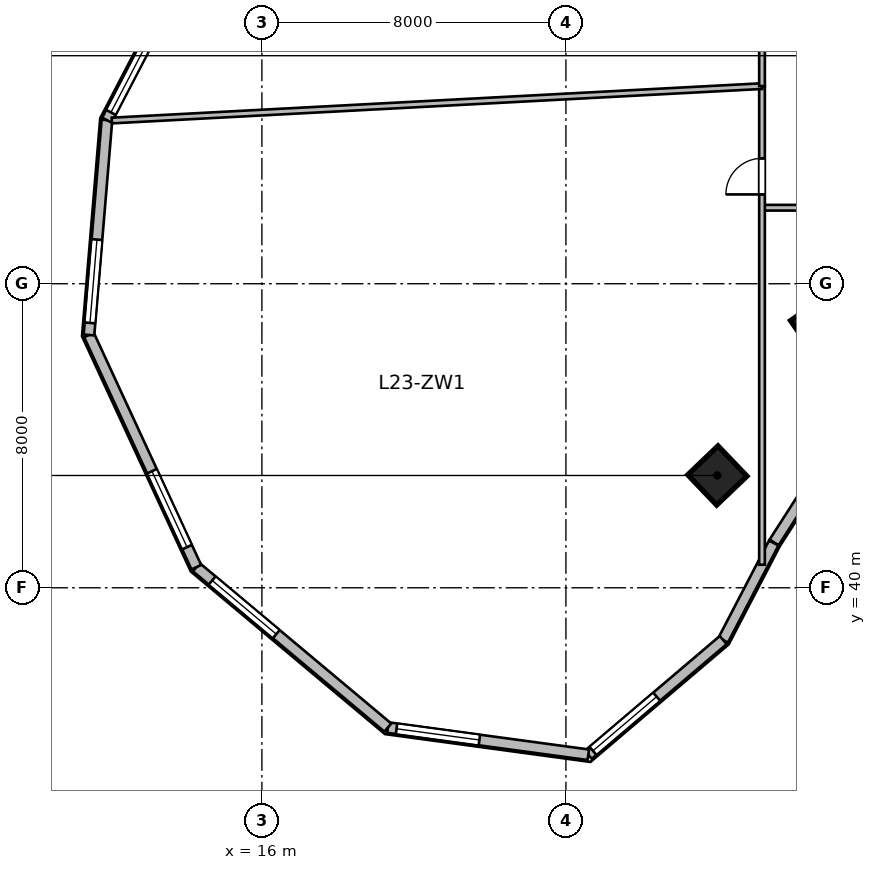
"""IFC4 building model, lengths in metres.
Left out: names, types, materials, properties, quantities, classifications, styles, units other than length and angle.
Written with IfcOpenShell. Run it as: python <this file> out.ifc"""

import sys

from ifc_helpers import new_model, si_unit, direction, frame, frame_2d, origin, origin_2d, place, context, subcontext, project, spatial, rectangle, extrude, source, transform, mapped, element, fill, save


model = new_model("IFC4")
c1 = context("Model", 3, precision=1e-05, world=origin(), true_north=direction((0.0, 1.0)))
c2 = subcontext(c1, "Body", "Model", "MODEL_VIEW")
j1 = project(units=[si_unit("LENGTHUNIT", "METRE"), si_unit("PLANEANGLEUNIT", "RADIAN")], contexts=[c1])
p1 = place(None, origin())
s1 = spatial("IfcSite", under=j1, at=p1, CompositionType="ELEMENT")
p2 = place(p1, origin())
s2 = spatial("IfcBuilding", under=s1, at=p2, CompositionType="ELEMENT")
p3 = place(p2, frame((0.0, 0.0, 99.9)))
s3 = spatial("IfcBuildingStorey", under=s2, at=p3, CompositionType="ELEMENT", Elevation=99.9)
m1 = source(origin(), c2, "Body", "SweptSolid", [
    extrude(rectangle(XDim=1.1, YDim=1.1, at=origin_2d()), origin(), (0.0, 0.0, 1.0), 3.9),
])
for number, where, z_axis, x_axis in (
    (1, (27.985, 42.955, 0.0), (0.0, 0.0, 1.0), (-0.691, 0.723, 0.0)),
    (2, (30.677, 46.892, 0.0), (0.0, 0.0, 1.0), (-0.571, 0.821, 0.0)),
):
    element("IfcColumn", number, at=place(p3, frame(where, z_axis=z_axis, x_axis=x_axis)), inside=s3, PredefinedType="COLUMN", context=c2, shape_type="MappedRepresentation", body=[
        mapped(m1, transform((0.0, 0.0, 0.0), scale=1.0)),
    ])
m2 = source(origin(), c2, "Body", "SweptSolid", [
    extrude(rectangle(XDim=2.84, YDim=0.28, at=frame_2d((1.42, 0.0))), origin(), (0.0, 0.0, 1.0), 3.65),
])
p4 = place(p3, frame((31.011, 43.582, 0.0), z_axis=(0.0, 0.0, 1.0), x_axis=(-0.540214368057, -0.841527442538, 0.0)))
e3 = element("IfcWall", 3, at=p4, inside=s3, PredefinedType="SOLIDWALL", context=c2, shape_type="MappedRepresentation", body=[
    mapped(m2, transform((0.0, 0.0, 0.0), scale=1.0)),
])
m3 = source(origin(), c2, "Body", "SweptSolid", [
    extrude(rectangle(XDim=2.88, YDim=0.28, at=frame_2d((1.44, 0.0))), origin(), (0.0, 0.0, 1.0), 3.65),
])
p5 = place(p3, frame((29.469, 41.178, 0.0), z_axis=(0.0, 0.0, 1.0), x_axis=(-0.461769086658, -0.887000175088, 0.0)))
e4 = element("IfcWall", 4, at=p5, inside=s3, PredefinedType="SOLIDWALL", context=c2, shape_type="MappedRepresentation", body=[
    mapped(m3, transform((0.0, 0.0, 0.0), scale=1.0)),
])
m4 = source(origin(), c2, "Body", "SweptSolid", [
    extrude(rectangle(XDim=4.659, YDim=0.28, at=frame_2d((2.33, 0.0))), origin(), (0.0, 0.0, 1.0), 3.65),
])
p6 = place(p3, frame((28.139, 38.624, 0.0), z_axis=(0.0, 0.0, 1.0), x_axis=(-0.761913458795, -0.647678841176, 0.0)))
e5 = element("IfcWall", 5, at=p6, inside=s3, PredefinedType="SOLIDWALL", context=c2, shape_type="MappedRepresentation", body=[
    mapped(m4, transform((0.0, 0.0, 0.0), scale=1.0)),
])
p7 = place(p6, frame((2.299, 0.0, 0.95)))
e6 = element("IfcOpeningElement", 6, at=p7, cuts=e5, PredefinedType="OPENING", context=c2, shape_type="SweptSolid", body=[
    extrude(rectangle(XDim=2.2, YDim=2.1, at=frame_2d((1.1, 1.05))), frame((0.0, 0.15, 0.0), z_axis=(0.0, -1.0, 0.0), x_axis=(1.0, 0.0, 0.0)), (0.0, 0.0, 1.0), 0.3),
])
m5 = source(origin(), c2, "Body", "SweptSolid", [
    extrude(rectangle(XDim=5.324, YDim=0.28, at=frame_2d((2.662, 0.0))), origin(), (0.0, 0.0, 1.0), 3.65),
])
p8 = place(p3, frame((24.59, 35.606, 0.0), z_axis=(0.0, 0.0, 1.0), x_axis=(-0.990931467223, 0.134368252451, 0.0)))
e7 = element("IfcWall", 7, at=p8, inside=s3, PredefinedType="SOLIDWALL", context=c2, shape_type="MappedRepresentation", body=[
    mapped(m5, transform((0.0, 0.0, 0.0), scale=1.0)),
])
p9 = place(p8, frame((2.893, 0.0, 0.95)))
e8 = element("IfcOpeningElement", 8, at=p9, cuts=e7, PredefinedType="OPENING", context=c2, shape_type="SweptSolid", body=[
    extrude(rectangle(XDim=2.2, YDim=2.1, at=frame_2d((1.1, 1.05))), frame((0.0, 0.15, 0.0), z_axis=(0.0, -1.0, 0.0), x_axis=(1.0, 0.0, 0.0)), (0.0, 0.0, 1.0), 0.3),
])
m6 = source(origin(), c2, "Body", "SweptSolid", [
    extrude(rectangle(XDim=6.573, YDim=0.28, at=frame_2d((3.287, 0.0))), origin(), (0.0, 0.0, 1.0), 3.65),
])
p10 = place(p3, frame((19.314, 36.322, 0.0), z_axis=(0.0, 0.0, 1.0), x_axis=(-0.766715154163, 0.641987439423, 0.0)))
e9 = element("IfcWall", 9, at=p10, inside=s3, PredefinedType="SOLIDWALL", context=c2, shape_type="MappedRepresentation", body=[
    mapped(m6, transform((0.0, 0.0, 0.0), scale=1.0)),
])
p11 = place(p10, frame((3.83, 0.0, 0.95)))
e10 = element("IfcOpeningElement", 10, at=p11, cuts=e9, PredefinedType="OPENING", context=c2, shape_type="SweptSolid", body=[
    extrude(rectangle(XDim=2.2, YDim=2.1, at=frame_2d((1.1, 1.05))), frame((0.0, 0.15, 0.0), z_axis=(0.0, -1.0, 0.0), x_axis=(1.0, 0.0, 0.0)), (0.0, 0.0, 1.0), 0.3),
])
m7 = source(origin(), c2, "Body", "SweptSolid", [
    extrude(rectangle(XDim=6.732, YDim=0.28, at=frame_2d((3.366, 0.0))), origin(), (0.0, 0.0, 1.0), 3.65),
])
p12 = place(p3, frame((14.275, 40.541, 0.0), z_axis=(0.0, 0.0, 1.0), x_axis=(-0.419644552709, 0.907688520023, 0.0)))
e11 = element("IfcWall", 11, at=p12, inside=s3, PredefinedType="SOLIDWALL", context=c2, shape_type="MappedRepresentation", body=[
    mapped(m7, transform((0.0, 0.0, 0.0), scale=1.0)),
])
p13 = place(p12, frame((0.583, 0.0, 0.95)))
e12 = element("IfcOpeningElement", 12, at=p13, cuts=e11, PredefinedType="OPENING", context=c2, shape_type="SweptSolid", body=[
    extrude(rectangle(XDim=2.2, YDim=2.1, at=frame_2d((1.1, 1.05))), frame((0.0, 0.15, 0.0), z_axis=(0.0, -1.0, 0.0), x_axis=(1.0, 0.0, 0.0)), (0.0, 0.0, 1.0), 0.3),
])
m8 = source(origin(), c2, "Body", "SweptSolid", [
    extrude(rectangle(XDim=5.674, YDim=0.28, at=frame_2d((2.837, 0.0))), origin(), (0.0, 0.0, 1.0), 3.65),
])
p14 = place(p3, frame((11.45, 46.652, 0.0), z_axis=(0.0, 0.0, 1.0), x_axis=(0.083309007867, 0.996523762491, 0.0)))
e13 = element("IfcWall", 13, at=p14, inside=s3, PredefinedType="SOLIDWALL", context=c2, shape_type="MappedRepresentation", body=[
    mapped(m8, transform((0.0, 0.0, 0.0), scale=1.0)),
])
p15 = place(p14, frame((0.318, 0.0, 0.95)))
e14 = element("IfcOpeningElement", 14, at=p15, cuts=e13, PredefinedType="OPENING", context=c2, shape_type="SweptSolid", body=[
    extrude(rectangle(XDim=2.2, YDim=2.1, at=frame_2d((1.1, 1.05))), frame((0.0, 0.15, 0.0), z_axis=(0.0, -1.0, 0.0), x_axis=(1.0, 0.0, 0.0)), (0.0, 0.0, 1.0), 0.3),
])
m9 = source(origin(), c2, "Body", "SweptSolid", [
    extrude(rectangle(XDim=5.315, YDim=0.28, at=frame_2d((2.658, 0.0))), origin(), (0.0, 0.0, 1.0), 3.65),
])
p16 = place(p3, frame((11.922, 52.305, 0.0), z_axis=(0.0, 0.0, 1.0), x_axis=(0.461760527822, 0.887004630735, 0.0)))
e15 = element("IfcWall", 15, at=p16, inside=s3, PredefinedType="SOLIDWALL", context=c2, shape_type="MappedRepresentation", body=[
    mapped(m9, transform((0.0, 0.0, 0.0), scale=1.0)),
])
p17 = place(p16, frame((0.229, 0.0, 0.95)))
e16 = element("IfcOpeningElement", 16, at=p17, cuts=e15, PredefinedType="OPENING", context=c2, shape_type="SweptSolid", body=[
    extrude(rectangle(XDim=2.2, YDim=2.1, at=frame_2d((1.1, 1.05))), frame((0.0, 0.15, 0.0), z_axis=(0.0, -1.0, 0.0), x_axis=(1.0, 0.0, 0.0)), (0.0, 0.0, 1.0), 0.3),
])
m10 = source(origin(), c2, "Body", "SweptSolid", [
    extrude(rectangle(XDim=2.5, YDim=0.15, at=frame_2d((1.25, 0.0))), origin(), (0.0, 0.0, 1.0), 3.65),
])
p18 = place(p3, frame((29.2, 50.0, 0.0), z_axis=(0.0, 0.0, 1.0), x_axis=(1.0, 0.0, 0.0)))
e17 = element("IfcWall", 17, at=p18, inside=s3, PredefinedType="PARTITIONING", context=c2, shape_type="MappedRepresentation", body=[
    mapped(m10, transform((0.0, 0.0, 0.0), scale=1.0)),
])
m11 = source(origin(), c2, "Body", "SweptSolid", [
    extrude(rectangle(XDim=12.594, YDim=0.15, at=frame_2d((6.297, 0.0))), origin(), (0.0, 0.0, 1.0), 2.942),
])
p19 = place(p3, frame((29.16, 40.606, 0.0), z_axis=(0.0, 0.0, 1.0), x_axis=(0.0, 1.0, 0.0)))
e18 = element("IfcWall", 18, at=p19, inside=s3, PredefinedType="PARTITIONING", context=c2, shape_type="MappedRepresentation", body=[
    mapped(m11, transform((0.0, 0.0, 0.0), scale=1.0)),
])
p20 = place(p19, frame((9.744, 0.0, 0.0)))
e19 = element("IfcOpeningElement", 19, at=p20, cuts=e18, PredefinedType="OPENING", context=c2, shape_type="SweptSolid", body=[
    extrude(rectangle(XDim=0.95, YDim=2.1, at=frame_2d((0.475, 1.05))), frame((0.0, 0.085, 0.0), z_axis=(0.0, -1.0, 0.0), x_axis=(1.0, 0.0, 0.0)), (0.0, 0.0, 1.0), 0.17),
])
m12 = source(origin(), c2, "Body", "SweptSolid", [
    extrude(rectangle(XDim=17.132, YDim=0.15, at=frame_2d((8.566, 0.0))), origin(), (0.0, 0.0, 1.0), 3.65),
])
p21 = place(p3, frame((12.052, 52.294, 0.0), z_axis=(0.0, 0.0, 1.0), x_axis=(0.998601444231, 0.05286923094, 0.0)))
e20 = element("IfcWall", 20, at=p21, inside=s3, PredefinedType="PARTITIONING", context=c2, shape_type="MappedRepresentation", body=[
    mapped(m12, transform((0.0, 0.0, 0.0), scale=1.0)),
])
m13 = source(origin(), c2, "Body", "SweptSolid", [
    extrude(rectangle(XDim=5.4, YDim=0.15, at=frame_2d((2.7, 0.0))), origin(), (0.0, 0.0, 1.0), 3.022),
])
p22 = place(p3, frame((29.16, 53.2, 0.0), z_axis=(0.0, 0.0, 1.0), x_axis=(0.0, 1.0, 0.0)))
e21 = element("IfcWall", 21, at=p22, inside=s3, PredefinedType="PARTITIONING", context=c2, shape_type="MappedRepresentation", body=[
    mapped(m13, transform((0.0, 0.0, 0.0), scale=1.0)),
])
p23 = place(p22, frame((2.225, 0.0, 0.0)))
e22 = element("IfcOpeningElement", 22, at=p23, cuts=e21, PredefinedType="OPENING", context=c2, shape_type="SweptSolid", body=[
    extrude(rectangle(XDim=0.95, YDim=2.1, at=frame_2d((0.475, 1.05))), frame((0.0, 0.085, 0.0), z_axis=(0.0, -1.0, 0.0), x_axis=(1.0, 0.0, 0.0)), (0.0, 0.0, 1.0), 0.17),
])
m14 = source(origin(), c2, "Body", "SweptSolid", [
    extrude(rectangle(XDim=2.2, YDim=2.1, at=frame_2d((1.1, 1.05))), frame((0.0, 0.03, 0.0), z_axis=(0.0, -1.0, 0.0), x_axis=(1.0, 0.0, 0.0)), (0.0, 0.0, 1.0), 0.06),
])
p24 = place(p7, origin())
e23 = element("IfcWindow", 23, at=p24, inside=s3, PartitioningType="TRIPLE_PANEL_VERTICAL", PredefinedType="WINDOW", context=c2, shape_type="MappedRepresentation", body=[
    mapped(m14, transform((0.0, 0.0, 0.0), scale=1.0)),
])
fill(e6, e23)
p25 = place(p9, origin())
e24 = element("IfcWindow", 24, at=p25, inside=s3, PartitioningType="TRIPLE_PANEL_VERTICAL", PredefinedType="WINDOW", context=c2, shape_type="MappedRepresentation", body=[
    mapped(m14, transform((0.0, 0.0, 0.0), scale=1.0)),
])
fill(e8, e24)
p26 = place(p11, origin())
e25 = element("IfcWindow", 25, at=p26, inside=s3, PartitioningType="TRIPLE_PANEL_VERTICAL", PredefinedType="WINDOW", context=c2, shape_type="MappedRepresentation", body=[
    mapped(m14, transform((0.0, 0.0, 0.0), scale=1.0)),
])
fill(e10, e25)
p27 = place(p13, origin())
e26 = element("IfcWindow", 26, at=p27, inside=s3, PartitioningType="TRIPLE_PANEL_VERTICAL", PredefinedType="WINDOW", context=c2, shape_type="MappedRepresentation", body=[
    mapped(m14, transform((0.0, 0.0, 0.0), scale=1.0)),
])
fill(e12, e26)
p28 = place(p15, origin())
e27 = element("IfcWindow", 27, at=p28, inside=s3, PartitioningType="TRIPLE_PANEL_VERTICAL", PredefinedType="WINDOW", context=c2, shape_type="MappedRepresentation", body=[
    mapped(m14, transform((0.0, 0.0, 0.0), scale=1.0)),
])
fill(e14, e27)
p29 = place(p17, origin())
e28 = element("IfcWindow", 28, at=p29, inside=s3, PartitioningType="TRIPLE_PANEL_VERTICAL", PredefinedType="WINDOW", context=c2, shape_type="MappedRepresentation", body=[
    mapped(m14, transform((0.0, 0.0, 0.0), scale=1.0)),
])
fill(e16, e28)
m15 = source(origin(), c2, "Body", "SweptSolid", [
    extrude(rectangle(XDim=0.95, YDim=2.1, at=frame_2d((0.475, 1.05))), frame((0.0, 0.025, 0.0), z_axis=(0.0, -1.0, 0.0), x_axis=(1.0, 0.0, 0.0)), (0.0, 0.0, 1.0), 0.05),
])
p30 = place(p20, origin())
e29 = element("IfcDoor", 29, at=p30, inside=s3, OperationType="SINGLE_SWING_LEFT", PredefinedType="DOOR", context=c2, shape_type="MappedRepresentation", body=[
    mapped(m15, transform((0.0, 0.0, 0.0), scale=1.0)),
])
fill(e19, e29)
save(model, sys.argv[1])
